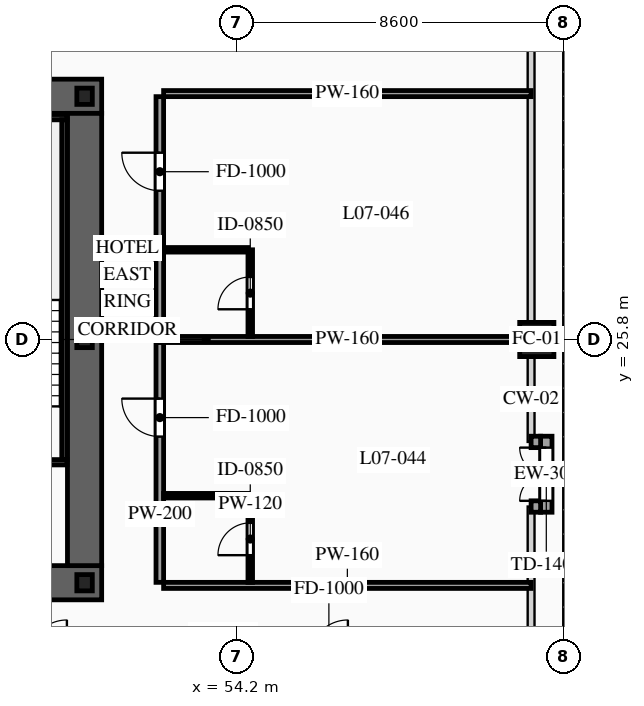
"""IFC4 building model, lengths in metres.
Left out: names, types, materials, properties, quantities, classifications, styles, units other than length and angle.
Written with IfcOpenShell. Run it as: python <this file> out.ifc"""

import sys

from ifc_helpers import new_model, si_unit, direction, frame, frame_2d, origin, origin_2d, place, context, subcontext, project, spatial, rectangle, hollow_rectangle, i_section, extrude, source, transform, mapped, element, fill, save


model = new_model("IFC4")
c1 = context("Model", 3, precision=1e-05, world=origin(), true_north=direction((0.0, 1.0)))
c2 = subcontext(c1, "Body", "Model", "MODEL_VIEW")
j1 = project(units=[si_unit("LENGTHUNIT", "METRE"), si_unit("PLANEANGLEUNIT", "RADIAN")], contexts=[c1])
p1 = place(None, origin())
s1 = spatial("IfcSite", under=j1, at=p1, CompositionType="ELEMENT")
p2 = place(p1, origin())
s2 = spatial("IfcBuilding", under=s1, at=p2, CompositionType="ELEMENT")
p3 = place(p2, frame((0.0, 0.0, 30.6)))
s3 = spatial("IfcBuildingStorey", under=s2, at=p3, CompositionType="ELEMENT", Elevation=30.6)
p4 = place(p3, frame((23.35, 19.4, 0.0), z_axis=(0.0, 0.0, 1.0), x_axis=(1.0, 0.0, 0.0)))
e1 = element("IfcWall", 1, at=p4, inside=s3, PredefinedType="SHEAR", context=c2, shape_type="SweptSolid", body=[
    extrude(rectangle(XDim=27.3, YDim=0.9, at=frame_2d((13.65, 0.0))), origin(), (0.0, 0.0, 1.0), 3.6),
])
p5 = place(p4, frame((2.1, 0.0, 0.0)))
e2 = element("IfcOpeningElement", 2, at=p5, cuts=e1, PredefinedType="OPENING", context=c2, shape_type="SweptSolid", body=[
    extrude(rectangle(XDim=1.1, YDim=2.2, at=frame_2d((0.55, 1.1))), frame((0.0, 0.465, 0.0), z_axis=(0.0, -1.0, 0.0), x_axis=(1.0, 0.0, 0.0)), (0.0, 0.0, 1.0), 0.93),
])
p6 = place(p4, frame((10.0, 0.0, 0.0)))
e3 = element("IfcOpeningElement", 3, at=p6, cuts=e1, PredefinedType="OPENING", context=c2, shape_type="SweptSolid", body=[
    extrude(rectangle(XDim=1.1, YDim=2.2, at=frame_2d((0.55, 1.1))), frame((0.0, 0.465, 0.0), z_axis=(0.0, -1.0, 0.0), x_axis=(1.0, 0.0, 0.0)), (0.0, 0.0, 1.0), 0.93),
])
p7 = place(p4, frame((23.2, 0.0, 0.0)))
e4 = element("IfcOpeningElement", 4, at=p7, cuts=e1, PredefinedType="OPENING", context=c2, shape_type="SweptSolid", body=[
    extrude(rectangle(XDim=1.1, YDim=2.2, at=frame_2d((0.55, 1.1))), frame((0.0, 0.465, 0.0), z_axis=(0.0, -1.0, 0.0), x_axis=(1.0, 0.0, 0.0)), (0.0, 0.0, 1.0), 0.93),
])
p8 = place(p4, frame((19.82, 0.0, 0.0)))
e5 = element("IfcOpeningElement", 5, at=p8, cuts=e1, PredefinedType="OPENING", context=c2, shape_type="SweptSolid", body=[
    extrude(rectangle(XDim=0.9, YDim=2.15, at=frame_2d((0.45, 1.075))), frame((0.0, 0.465, 0.0), z_axis=(0.0, -1.0, 0.0), x_axis=(1.0, 0.0, 0.0)), (0.0, 0.0, 1.0), 0.93),
])
p9 = place(p4, frame((18.38, 0.0, 0.0)))
e6 = element("IfcOpeningElement", 6, at=p9, cuts=e1, PredefinedType="OPENING", context=c2, shape_type="SweptSolid", body=[
    extrude(rectangle(XDim=0.9, YDim=2.15, at=frame_2d((0.45, 1.075))), frame((0.0, 0.465, 0.0), z_axis=(0.0, -1.0, 0.0), x_axis=(1.0, 0.0, 0.0)), (0.0, 0.0, 1.0), 0.93),
])
p10 = place(p3, frame((23.35, 32.2, 0.0), z_axis=(0.0, 0.0, 1.0), x_axis=(1.0, 0.0, 0.0)))
e7 = element("IfcWall", 7, at=p10, inside=s3, PredefinedType="SHEAR", context=c2, shape_type="SweptSolid", body=[
    extrude(rectangle(XDim=27.3, YDim=0.9, at=frame_2d((13.65, 0.0))), origin(), (0.0, 0.0, 1.0), 3.6),
])
p11 = place(p10, frame((4.72, 0.0, 0.0)))
e8 = element("IfcOpeningElement", 8, at=p11, cuts=e7, PredefinedType="OPENING", context=c2, shape_type="SweptSolid", body=[
    extrude(rectangle(XDim=0.9, YDim=2.15, at=frame_2d((0.45, 1.075))), frame((0.0, 0.465, 0.0), z_axis=(0.0, -1.0, 0.0), x_axis=(1.0, 0.0, 0.0)), (0.0, 0.0, 1.0), 0.93),
])
p12 = place(p10, frame((10.0, 0.0, 0.0)))
e9 = element("IfcOpeningElement", 9, at=p12, cuts=e7, PredefinedType="OPENING", context=c2, shape_type="SweptSolid", body=[
    extrude(rectangle(XDim=1.1, YDim=2.2, at=frame_2d((0.55, 1.1))), frame((0.0, 0.465, 0.0), z_axis=(0.0, -1.0, 0.0), x_axis=(1.0, 0.0, 0.0)), (0.0, 0.0, 1.0), 0.93),
])
p13 = place(p10, frame((15.85, 0.0, 0.0)))
e10 = element("IfcOpeningElement", 10, at=p13, cuts=e7, PredefinedType="OPENING", context=c2, shape_type="SweptSolid", body=[
    extrude(rectangle(XDim=1.1, YDim=2.2, at=frame_2d((0.55, 1.1))), frame((0.0, 0.465, 0.0), z_axis=(0.0, -1.0, 0.0), x_axis=(1.0, 0.0, 0.0)), (0.0, 0.0, 1.0), 0.93),
])
m1 = source(origin(), c2, "Body", "SweptSolid", [
    extrude(rectangle(XDim=11.9, YDim=0.9, at=frame_2d((5.95, 0.0))), origin(), (0.0, 0.0, 1.0), 3.6),
])
p14 = place(p3, frame((50.2, 19.85, 0.0), z_axis=(0.0, 0.0, 1.0), x_axis=(0.0, 1.0, 0.0)))
e11 = element("IfcWall", 11, at=p14, inside=s3, PredefinedType="SHEAR", context=c2, shape_type="MappedRepresentation", body=[
    mapped(m1, transform((0.0, 0.0, 0.0), scale=1.0)),
])
m2 = source(origin(), c2, "Body", "SweptSolid", [
    extrude(i_section(OverallWidth=0.407, OverallDepth=0.428, WebThickness=0.02, FlangeThickness=0.035, at=origin_2d()), origin(), (0.0, 0.0, 1.0), 3.6),
])
for number, where, z_axis, x_axis in (
    (12, (50.2, 19.4, 0.0), (0.0, 0.0, 1.0), (1.0, 0.0, 0.0)),
    (13, (50.2, 25.8, 0.0), (0.0, 0.0, 1.0), (1.0, 0.0, 0.0)),
    (14, (50.2, 32.2, 0.0), (0.0, 0.0, 1.0), (1.0, 0.0, 0.0)),
):
    element("IfcColumn", number, at=place(p3, frame(where, z_axis=z_axis, x_axis=x_axis)), inside=s3, PredefinedType="COLUMN", context=c2, shape_type="MappedRepresentation", body=[
        mapped(m2, transform((0.0, 0.0, 0.0), scale=1.0)),
    ])
m3 = source(origin(), c2, "Body", "SweptSolid", [
    extrude(hollow_rectangle(XDim=0.9, YDim=0.9, WallThickness=0.042, at=origin_2d()), origin(), (0.0, 0.0, 1.0), 3.6),
])
p15 = place(p3, frame((62.1, 25.8, 0.0), z_axis=(0.0, 0.0, 1.0), x_axis=(1.0, 0.0, 0.0)))
e15 = element("IfcColumn", 15, at=p15, inside=s3, PredefinedType="COLUMN", context=c2, shape_type="MappedRepresentation", body=[
    mapped(m3, transform((0.0, 0.0, 0.0), scale=1.0)),
])
p16 = place(p3, frame((62.35, 21.255, 0.0), z_axis=(0.0, 0.0, 1.0), x_axis=(0.0, 1.0, 0.0)))
e16 = element("IfcWall", 16, at=p16, inside=s3, PredefinedType="SOLIDWALL", context=c2, shape_type="SweptSolid", body=[
    extrude(rectangle(XDim=2.0, YDim=0.3, at=frame_2d((1.0, 0.0))), origin(), (0.0, 0.0, 1.0), 3.38),
])
p17 = place(p16, frame((0.3, 0.0, 0.0)))
e17 = element("IfcOpeningElement", 17, at=p17, cuts=e16, PredefinedType="OPENING", context=c2, shape_type="SweptSolid", body=[
    extrude(rectangle(XDim=1.4, YDim=2.3, at=frame_2d((0.7, 1.15))), frame((0.0, 0.165, 0.0), z_axis=(0.0, -1.0, 0.0), x_axis=(1.0, 0.0, 0.0)), (0.0, 0.0, 1.0), 0.33),
])
m4 = source(origin(), c2, "Body", "SweptSolid", [
    extrude(rectangle(XDim=0.25, YDim=0.3, at=frame_2d((0.125, 0.0))), origin(), (0.0, 0.0, 1.0), 3.38),
])
for number, where, z_axis, x_axis in (
    (18, (61.95, 21.405, 0.0), (0.0, 0.0, 1.0), (1.0, 0.0, 0.0)),
    (19, (62.2, 23.105, 0.0), (0.0, 0.0, 1.0), (-1.0, 0.0, 0.0)),
):
    element("IfcWall", number, at=place(p3, frame(where, z_axis=z_axis, x_axis=x_axis)), inside=s3, PredefinedType="SOLIDWALL", context=c2, shape_type="MappedRepresentation", body=[
        mapped(m4, transform((0.0, 0.0, 0.0), scale=1.0)),
    ])
p18 = place(p3, frame((46.46, 22.57, 0.0), z_axis=(0.0, 0.0, 1.0), x_axis=(1.0, 0.0, 0.0)))
e20 = element("IfcWall", 20, at=p18, inside=s3, PredefinedType="SOLIDWALL", context=c2, shape_type="SweptSolid", body=[
    extrude(rectangle(XDim=3.28, YDim=0.14, at=frame_2d((1.64, 0.0))), origin(), (0.0, 0.0, 1.0), 3.38),
])
p19 = place(p18, frame((1.09, 0.0, 0.0)))
e21 = element("IfcOpeningElement", 21, at=p19, cuts=e20, PredefinedType="OPENING", context=c2, shape_type="SweptSolid", body=[
    extrude(rectangle(XDim=1.1, YDim=2.2, at=frame_2d((0.55, 1.1))), frame((0.0, 0.085, 0.0), z_axis=(0.0, -1.0, 0.0), x_axis=(1.0, 0.0, 0.0)), (0.0, 0.0, 1.0), 0.17),
])
m5 = source(origin(), c2, "Body", "SweptSolid", [
    extrude(rectangle(XDim=3.28, YDim=0.14, at=frame_2d((1.64, 0.0))), origin(), (0.0, 0.0, 1.0), 3.38),
])
p20 = place(p3, frame((46.46, 31.65, 0.0), z_axis=(0.0, 0.0, 1.0), x_axis=(1.0, 0.0, 0.0)))
e22 = element("IfcWall", 22, at=p20, inside=s3, PredefinedType="SOLIDWALL", context=c2, shape_type="MappedRepresentation", body=[
    mapped(m5, transform((0.0, 0.0, 0.0), scale=1.0)),
])
m6 = source(origin(), c2, "Body", "SweptSolid", [
    extrude(rectangle(XDim=8.94, YDim=0.14, at=frame_2d((4.47, 0.0))), origin(), (0.0, 0.0, 1.0), 3.38),
])
p21 = place(p3, frame((49.67, 22.64, 0.0), z_axis=(0.0, 0.0, 1.0), x_axis=(0.0, 1.0, 0.0)))
e23 = element("IfcWall", 23, at=p21, inside=s3, PredefinedType="SOLIDWALL", context=c2, shape_type="MappedRepresentation", body=[
    mapped(m6, transform((0.0, 0.0, 0.0), scale=1.0)),
])
p22 = place(p3, frame((52.18, 19.41, 0.0), z_axis=(0.0, 0.0, 1.0), x_axis=(0.0, 1.0, 0.0)))
e24 = element("IfcWall", 24, at=p22, inside=s3, PredefinedType="PARTITIONING", context=c2, shape_type="SweptSolid", body=[
    extrude(rectangle(XDim=6.31, YDim=0.2, at=frame_2d((3.155, 0.0))), origin(), (0.0, 0.0, 1.0), 3.38),
])
p23 = place(p22, frame((3.835, 0.0, 0.0)))
e25 = element("IfcOpeningElement", 25, at=p23, cuts=e24, PredefinedType="OPENING", context=c2, shape_type="SweptSolid", body=[
    extrude(rectangle(XDim=1.0, YDim=2.2, at=frame_2d((0.5, 1.1))), frame((0.0, 0.115, 0.0), z_axis=(0.0, -1.0, 0.0), x_axis=(1.0, 0.0, 0.0)), (0.0, 0.0, 1.0), 0.23),
])
m7 = source(origin(), c2, "Body", "SweptSolid", [
    extrude(rectangle(XDim=9.67, YDim=0.16, at=frame_2d((4.835, 0.0))), origin(), (0.0, 0.0, 1.0), 2.575),
])
p24 = place(p3, frame((52.28, 25.8, 0.0), z_axis=(0.0, 0.0, 1.0), x_axis=(1.0, 0.0, 0.0)))
e26 = element("IfcWall", 26, at=p24, inside=s3, PredefinedType="PARTITIONING", context=c2, shape_type="MappedRepresentation", body=[
    mapped(m7, transform((0.0, 0.0, 0.0), scale=1.0)),
])
m8 = source(origin(), c2, "Body", "SweptSolid", [
    extrude(rectangle(XDim=9.67, YDim=0.16, at=frame_2d((4.835, 0.0))), origin(), (0.0, 0.0, 1.0), 2.875),
])
p25 = place(p3, frame((52.28, 19.33, 0.0), z_axis=(0.0, 0.0, 1.0), x_axis=(1.0, 0.0, 0.0)))
e27 = element("IfcWall", 27, at=p25, inside=s3, PredefinedType="PARTITIONING", context=c2, shape_type="MappedRepresentation", body=[
    mapped(m8, transform((0.0, 0.0, 0.0), scale=1.0)),
])
p26 = place(p3, frame((54.56, 19.41, 0.0), z_axis=(0.0, 0.0, 1.0), x_axis=(0.0, 1.0, 0.0)))
e28 = element("IfcWall", 28, at=p26, inside=s3, PredefinedType="PARTITIONING", context=c2, shape_type="SweptSolid", body=[
    extrude(rectangle(XDim=2.28, YDim=0.12, at=frame_2d((1.14, 0.0))), origin(), (0.0, 0.0, 1.0), 3.38),
])
p27 = place(p26, frame((0.715, 0.0, 0.0)))
e29 = element("IfcOpeningElement", 29, at=p27, cuts=e28, PredefinedType="OPENING", context=c2, shape_type="SweptSolid", body=[
    extrude(rectangle(XDim=0.85, YDim=2.1, at=frame_2d((0.425, 1.05))), frame((0.0, 0.075, 0.0), z_axis=(0.0, -1.0, 0.0), x_axis=(1.0, 0.0, 0.0)), (0.0, 0.0, 1.0), 0.15),
])
m9 = source(origin(), c2, "Body", "SweptSolid", [
    extrude(rectangle(XDim=2.22, YDim=0.12, at=frame_2d((1.11, 0.0))), origin(), (0.0, 0.0, 1.0), 3.38),
])
p28 = place(p3, frame((52.28, 21.69, 0.0), z_axis=(0.0, 0.0, 1.0), x_axis=(1.0, 0.0, 0.0)))
e30 = element("IfcWall", 30, at=p28, inside=s3, PredefinedType="PARTITIONING", context=c2, shape_type="MappedRepresentation", body=[
    mapped(m9, transform((0.0, 0.0, 0.0), scale=1.0)),
])
p29 = place(p3, frame((52.18, 25.88, 0.0), z_axis=(0.0, 0.0, 1.0), x_axis=(0.0, 1.0, 0.0)))
e31 = element("IfcWall", 31, at=p29, inside=s3, PredefinedType="PARTITIONING", context=c2, shape_type="SweptSolid", body=[
    extrude(rectangle(XDim=6.31, YDim=0.2, at=frame_2d((3.155, 0.0))), origin(), (0.0, 0.0, 1.0), 3.38),
])
p30 = place(p29, frame((3.835, 0.0, 0.0)))
e32 = element("IfcOpeningElement", 32, at=p30, cuts=e31, PredefinedType="OPENING", context=c2, shape_type="SweptSolid", body=[
    extrude(rectangle(XDim=1.0, YDim=2.2, at=frame_2d((0.5, 1.1))), frame((0.0, 0.115, 0.0), z_axis=(0.0, -1.0, 0.0), x_axis=(1.0, 0.0, 0.0)), (0.0, 0.0, 1.0), 0.23),
])
p31 = place(p3, frame((52.28, 32.27, 0.0), z_axis=(0.0, 0.0, 1.0), x_axis=(1.0, 0.0, 0.0)))
e33 = element("IfcWall", 33, at=p31, inside=s3, PredefinedType="PARTITIONING", context=c2, shape_type="MappedRepresentation", body=[
    mapped(m8, transform((0.0, 0.0, 0.0), scale=1.0)),
])
p32 = place(p3, frame((54.56, 25.88, 0.0), z_axis=(0.0, 0.0, 1.0), x_axis=(0.0, 1.0, 0.0)))
e34 = element("IfcWall", 34, at=p32, inside=s3, PredefinedType="PARTITIONING", context=c2, shape_type="SweptSolid", body=[
    extrude(rectangle(XDim=2.28, YDim=0.12, at=frame_2d((1.14, 0.0))), origin(), (0.0, 0.0, 1.0), 3.38),
])
p33 = place(p32, frame((0.715, 0.0, 0.0)))
e35 = element("IfcOpeningElement", 35, at=p33, cuts=e34, PredefinedType="OPENING", context=c2, shape_type="SweptSolid", body=[
    extrude(rectangle(XDim=0.85, YDim=2.1, at=frame_2d((0.425, 1.05))), frame((0.0, 0.075, 0.0), z_axis=(0.0, -1.0, 0.0), x_axis=(1.0, 0.0, 0.0)), (0.0, 0.0, 1.0), 0.15),
])
p34 = place(p3, frame((52.28, 28.16, 0.0), z_axis=(0.0, 0.0, 1.0), x_axis=(1.0, 0.0, 0.0)))
e36 = element("IfcWall", 36, at=p34, inside=s3, PredefinedType="PARTITIONING", context=c2, shape_type="MappedRepresentation", body=[
    mapped(m9, transform((0.0, 0.0, 0.0), scale=1.0)),
])
m10 = source(origin(), c2, "Body", "SweptSolid", [
    extrude(rectangle(XDim=1.4, YDim=2.3, at=frame_2d((0.7, 1.15))), frame((0.0, 0.025, 0.0), z_axis=(0.0, -1.0, 0.0), x_axis=(1.0, 0.0, 0.0)), (0.0, 0.0, 1.0), 0.05),
])
p35 = place(p17, origin())
e37 = element("IfcDoor", 37, at=p35, inside=s3, OperationType="DOUBLE_DOOR_SINGLE_SWING", PredefinedType="DOOR", context=c2, shape_type="MappedRepresentation", body=[
    mapped(m10, transform((0.0, 0.0, 0.0), scale=1.0)),
])
fill(e17, e37)
m11 = source(origin(), c2, "Body", "SweptSolid", [
    extrude(rectangle(XDim=1.0, YDim=2.2, at=frame_2d((0.5, 1.1))), frame((0.0, 0.025, 0.0), z_axis=(0.0, -1.0, 0.0), x_axis=(1.0, 0.0, 0.0)), (0.0, 0.0, 1.0), 0.05),
])
p36 = place(p23, origin())
e38 = element("IfcDoor", 38, at=p36, inside=s3, OperationType="SINGLE_SWING_RIGHT", PredefinedType="DOOR", context=c2, shape_type="MappedRepresentation", body=[
    mapped(m11, transform((0.0, 0.0, 0.0), scale=1.0)),
])
fill(e25, e38)
m12 = source(origin(), c2, "Body", "SweptSolid", [
    extrude(rectangle(XDim=0.85, YDim=2.1, at=frame_2d((0.425, 1.05))), frame((0.0, 0.025, 0.0), z_axis=(0.0, -1.0, 0.0), x_axis=(1.0, 0.0, 0.0)), (0.0, 0.0, 1.0), 0.05),
])
p37 = place(p27, origin())
e39 = element("IfcDoor", 39, at=p37, inside=s3, OperationType="SINGLE_SWING_LEFT", PredefinedType="DOOR", context=c2, shape_type="MappedRepresentation", body=[
    mapped(m12, transform((0.0, 0.0, 0.0), scale=1.0)),
])
fill(e29, e39)
p38 = place(p30, origin())
e40 = element("IfcDoor", 40, at=p38, inside=s3, OperationType="SINGLE_SWING_RIGHT", PredefinedType="DOOR", context=c2, shape_type="MappedRepresentation", body=[
    mapped(m11, transform((0.0, 0.0, 0.0), scale=1.0)),
])
fill(e32, e40)
p39 = place(p33, origin())
e41 = element("IfcDoor", 41, at=p39, inside=s3, OperationType="SINGLE_SWING_LEFT", PredefinedType="DOOR", context=c2, shape_type="MappedRepresentation", body=[
    mapped(m12, transform((0.0, 0.0, 0.0), scale=1.0)),
])
fill(e35, e41)
save(model, sys.argv[1])
